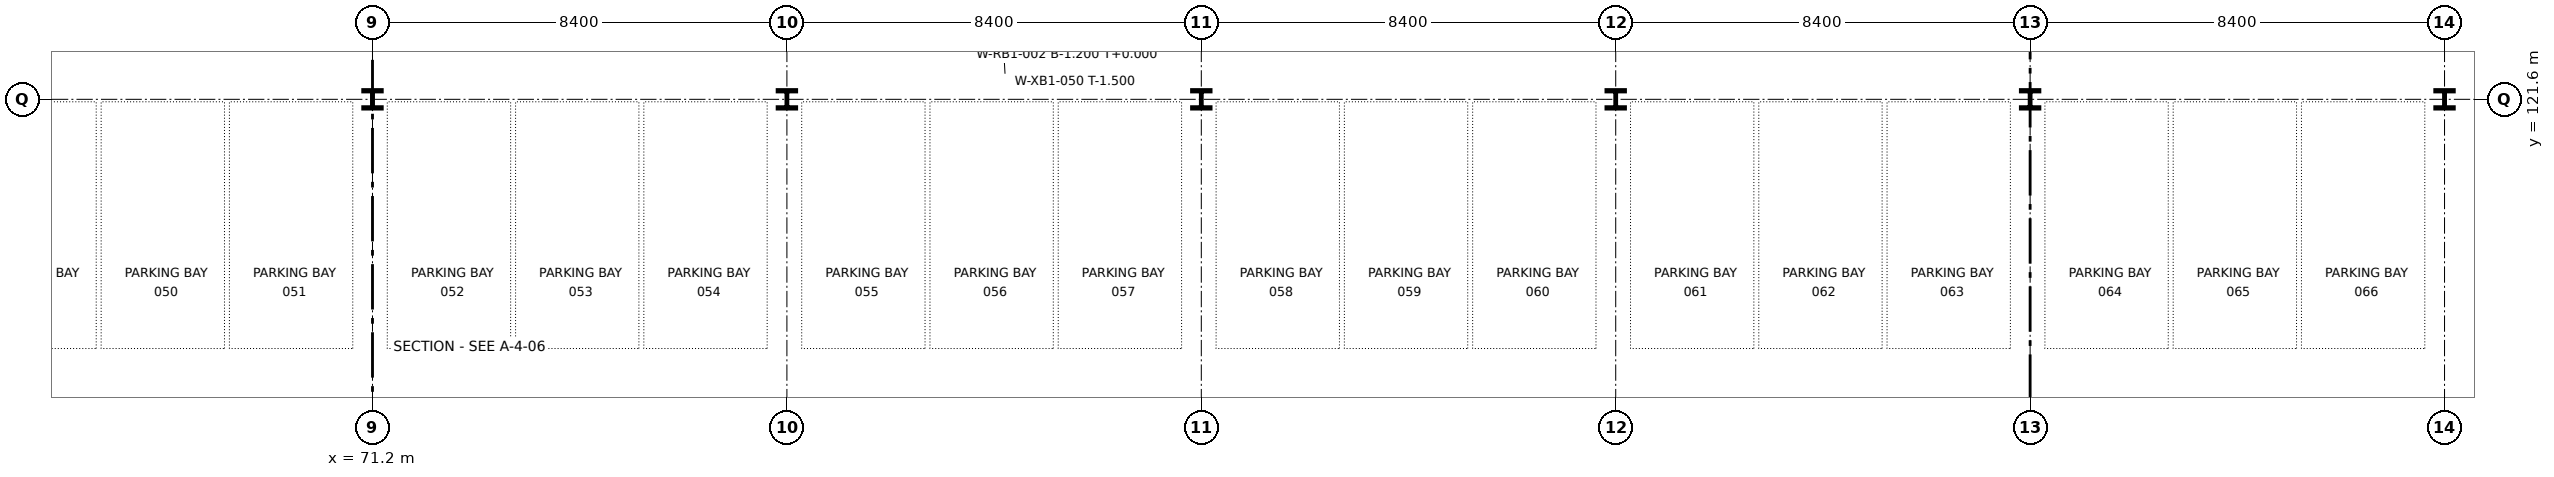
"""IFC4 building model, lengths in metres.
Left out: names, types, materials, properties, quantities, classifications, styles, units other than length and angle.
Written with IfcOpenShell. Run it as: python <this file> out.ifc"""

import sys

from ifc_helpers import new_model, si_unit, direction, frame, origin, origin_2d, place, context, subcontext, project, spatial, i_section, extrude, element, save


model = new_model("IFC4")
c1 = context("Model", 3, precision=1e-05, world=origin(), true_north=direction((0.0, 1.0)))
c2 = subcontext(c1, "Body", "Model", "MODEL_VIEW")
j1 = project(units=[si_unit("LENGTHUNIT", "METRE"), si_unit("PLANEANGLEUNIT", "RADIAN")], contexts=[c1])
p1 = place(None, origin())
s1 = spatial("IfcSite", under=j1, at=p1, CompositionType="ELEMENT")
p2 = place(p1, origin())
s2 = spatial("IfcBuilding", under=s1, at=p2, CompositionType="ELEMENT")
p3 = place(p2, frame((0.0, 0.0, -4.6)))
s3 = spatial("IfcBuildingStorey", under=s2, at=p3, CompositionType="ELEMENT", Elevation=-4.6)
for number, where, z_axis, x_axis in (
    (1, (71.2, 121.6, 0.0), (0.0, 0.0, 1.0), (1.0, 0.0, 0.0)),
    (2, (79.6, 121.6, 0.0), (0.0, 0.0, 1.0), (1.0, 0.0, 0.0)),
    (3, (88.0, 121.6, 0.0), (0.0, 0.0, 1.0), (1.0, 0.0, 0.0)),
    (4, (96.4, 121.6, 0.0), (0.0, 0.0, 1.0), (1.0, 0.0, 0.0)),
    (5, (104.8, 121.6, 0.0), (0.0, 0.0, 1.0), (1.0, 0.0, 0.0)),
    (6, (113.2, 121.6, 0.0), (0.0, 0.0, 1.0), (1.0, 0.0, 0.0)),
):
    element("IfcColumn", number, at=place(p3, frame(where, z_axis=z_axis, x_axis=x_axis)), inside=s3, PredefinedType="COLUMN", context=c2, shape_type="SweptSolid", body=[
        extrude(i_section(OverallWidth=0.373, OverallDepth=0.373, WebThickness=0.016, FlangeThickness=0.026, FilletRadius=0.015, at=origin_2d()), origin(), (0.0, 0.0, 1.0), 4.6),
    ])
save(model, sys.argv[1])
